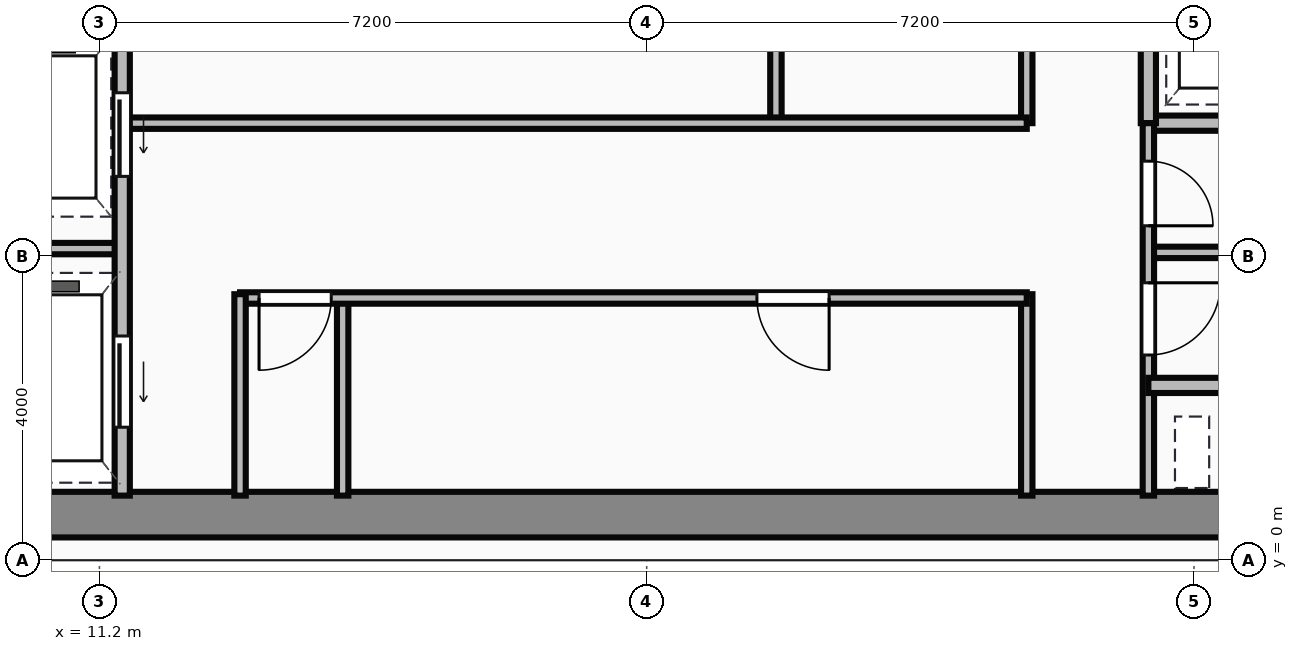
"""IFC4 building model, lengths in metres.
Left out: names, types, materials, properties, quantities, classifications, styles, units other than length and angle.
Written with IfcOpenShell. Run it as: python <this file> out.ifc"""

import sys

from ifc_helpers import new_model, si_unit, direction, frame, frame_2d, origin, place, context, subcontext, project, spatial, rectangle, extrude, source, transform, mapped, element, fill, save


model = new_model("IFC4")
c1 = context("Model", 3, precision=1e-05, world=origin(), true_north=direction((0.0, 1.0)))
c2 = subcontext(c1, "Body", "Model", "MODEL_VIEW")
j1 = project(units=[si_unit("LENGTHUNIT", "METRE"), si_unit("PLANEANGLEUNIT", "RADIAN")], contexts=[c1])
p1 = place(None, origin())
s1 = spatial("IfcSite", under=j1, at=p1, CompositionType="ELEMENT")
p2 = place(p1, origin())
s2 = spatial("IfcBuilding", under=s1, at=p2, CompositionType="ELEMENT")
p3 = place(p2, frame((0.0, 0.0, 195.9)))
s3 = spatial("IfcBuildingStorey", under=s2, at=p3, CompositionType="ELEMENT", Elevation=195.9)
m1 = source(origin(), c2, "Body", "SweptSolid", [
    extrude(rectangle(XDim=29.5, YDim=0.6, at=frame_2d((14.75, 0.0))), origin(), (0.0, 0.0, 1.0), 3.65),
])
p4 = place(p3, frame((4.5, 0.6, 0.0), z_axis=(0.0, 0.0, 1.0), x_axis=(1.0, 0.0, 0.0)))
e1 = element("IfcWall", 1, at=p4, inside=s3, PredefinedType="SHEAR", context=c2, shape_type="MappedRepresentation", body=[
    mapped(m1, transform((0.0, 0.0, 0.0))),
])
m2 = source(origin(), c2, "Body", "SweptSolid", [
    extrude(rectangle(XDim=9.6, YDim=0.2, at=frame_2d((4.8, 0.0))), origin(), (0.0, 0.0, 1.0), 3.4),
])
p5 = place(p3, frame((11.5, 0.85, 0.0), z_axis=(0.0, 0.0, 1.0), x_axis=(0.0, 1.0, 0.0)))
e2 = element("IfcWall", 2, at=p5, inside=s3, PredefinedType="PARTITIONING", context=c2, shape_type="MappedRepresentation", body=[
    mapped(m2, transform((0.0, 0.0, 0.0))),
])
p6 = place(p5, frame((4.2, 0.0, 0.0)))
e3 = element("IfcOpeningElement", 3, at=p6, cuts=e2, PredefinedType="OPENING", context=c2, shape_type="SweptSolid", body=[
    extrude(rectangle(XDim=1.1, YDim=2.15, at=frame_2d((0.55, 1.075))), frame((0.0, 0.11, 0.0), z_axis=(0.0, -1.0, 0.0), x_axis=(1.0, 0.0, 0.0)), (0.0, 0.0, 1.0), 0.22),
])
p7 = place(p5, frame((0.9, 0.0, 0.0)))
e4 = element("IfcOpeningElement", 4, at=p7, cuts=e2, PredefinedType="OPENING", context=c2, shape_type="SweptSolid", body=[
    extrude(rectangle(XDim=1.2, YDim=2.15, at=frame_2d((0.6, 1.075))), frame((0.0, 0.11, 0.0), z_axis=(0.0, -1.0, 0.0), x_axis=(1.0, 0.0, 0.0)), (0.0, 0.0, 1.0), 0.22),
])
m3 = source(origin(), c2, "Body", "SweptSolid", [
    extrude(rectangle(XDim=2.4, YDim=0.15, at=frame_2d((1.2, 0.0))), origin(), (0.0, 0.0, 1.0), 3.4),
])
p8 = place(p3, frame((9.1, 4.1, 0.0), z_axis=(0.0, 0.0, 1.0), x_axis=(1.0, 0.0, 0.0)))
e5 = element("IfcWall", 5, at=p8, inside=s3, PredefinedType="PARTITIONING", context=c2, shape_type="MappedRepresentation", body=[
    mapped(m3, transform((0.0, 0.0, 0.0))),
])
m4 = source(origin(), c2, "Body", "SweptSolid", [
    extrude(rectangle(XDim=2.65, YDim=0.15, at=frame_2d((1.325, 0.0))), origin(), (0.0, 0.0, 1.0), 3.4),
])
p9 = place(p3, frame((13.05, 0.85, 0.0), z_axis=(0.0, 0.0, 1.0), x_axis=(0.0, 1.0, 0.0)))
e6 = element("IfcWall", 6, at=p9, inside=s3, PredefinedType="PARTITIONING", context=c2, shape_type="MappedRepresentation", body=[
    mapped(m4, transform((0.0, 0.0, 0.0))),
])
m5 = source(origin(), c2, "Body", "SweptSolid", [
    extrude(rectangle(XDim=10.35, YDim=0.15, at=frame_2d((5.175, 0.0))), origin(), (0.0, 0.0, 1.0), 3.4),
])
p10 = place(p3, frame((13.05, 3.45, 0.0), z_axis=(0.0, 0.0, 1.0), x_axis=(1.0, 0.0, 0.0)))
e7 = element("IfcWall", 7, at=p10, inside=s3, PredefinedType="PARTITIONING", context=c2, shape_type="MappedRepresentation", body=[
    mapped(m5, transform((0.0, 0.0, 0.0))),
])
p11 = place(p10, frame((0.25, 0.0, 0.0)))
e8 = element("IfcOpeningElement", 8, at=p11, cuts=e7, PredefinedType="OPENING", context=c2, shape_type="SweptSolid", body=[
    extrude(rectangle(XDim=0.95, YDim=2.15, at=frame_2d((0.475, 1.075))), frame((0.0, 0.085, 0.0), z_axis=(0.0, -1.0, 0.0), x_axis=(1.0, 0.0, 0.0)), (0.0, 0.0, 1.0), 0.17),
])
p12 = place(p10, frame((6.8, 0.0, 0.0)))
e9 = element("IfcOpeningElement", 9, at=p12, cuts=e7, PredefinedType="OPENING", context=c2, shape_type="SweptSolid", body=[
    extrude(rectangle(XDim=0.95, YDim=2.15, at=frame_2d((0.475, 1.075))), frame((0.0, 0.085, 0.0), z_axis=(0.0, -1.0, 0.0), x_axis=(1.0, 0.0, 0.0)), (0.0, 0.0, 1.0), 0.17),
])
p13 = place(p3, frame((23.4, 0.85, 0.0), z_axis=(0.0, 0.0, 1.0), x_axis=(0.0, 1.0, 0.0)))
e10 = element("IfcWall", 10, at=p13, inside=s3, PredefinedType="PARTITIONING", context=c2, shape_type="MappedRepresentation", body=[
    mapped(m4, transform((0.0, 0.0, 0.0))),
])
m6 = source(origin(), c2, "Body", "SweptSolid", [
    extrude(rectangle(XDim=2.6, YDim=0.15, at=frame_2d((1.3, 0.0))), origin(), (0.0, 0.0, 1.0), 3.4),
])
p14 = place(p3, frame((14.4, 0.85, 0.0), z_axis=(0.0, 0.0, 1.0), x_axis=(0.0, 1.0, 0.0)))
e11 = element("IfcWall", 11, at=p14, inside=s3, PredefinedType="PARTITIONING", context=c2, shape_type="MappedRepresentation", body=[
    mapped(m6, transform((0.0, 0.0, 0.0))),
])
m7 = source(origin(), c2, "Body", "SweptSolid", [
    extrude(rectangle(XDim=11.85, YDim=0.15, at=frame_2d((5.925, 0.0))), origin(), (0.0, 0.0, 1.0), 3.4),
])
p15 = place(p3, frame((11.55, 5.75, 0.0), z_axis=(0.0, 0.0, 1.0), x_axis=(1.0, 0.0, 0.0)))
e12 = element("IfcWall", 12, at=p15, inside=s3, PredefinedType="PARTITIONING", context=c2, shape_type="MappedRepresentation", body=[
    mapped(m7, transform((0.0, 0.0, 0.0))),
])
m8 = source(origin(), c2, "Body", "SweptSolid", [
    extrude(rectangle(XDim=2.6, YDim=0.15, at=frame_2d((1.3, 0.0))), origin(), (0.0, 0.0, 1.0), 3.4),
])
p16 = place(p3, frame((23.4, 5.75, 0.0), z_axis=(0.0, 0.0, 1.0), x_axis=(0.0, 1.0, 0.0)))
e13 = element("IfcWall", 13, at=p16, inside=s3, PredefinedType="PARTITIONING", context=c2, shape_type="MappedRepresentation", body=[
    mapped(m8, transform((0.0, 0.0, 0.0))),
])
m9 = source(origin(), c2, "Body", "SweptSolid", [
    extrude(rectangle(XDim=2.5, YDim=0.15, at=frame_2d((1.25, 0.0))), origin(), (0.0, 0.0, 1.0), 3.4),
])
p17 = place(p3, frame((20.1, 5.8, 0.0), z_axis=(0.0, 0.0, 1.0), x_axis=(0.0, 1.0, 0.0)))
e14 = element("IfcWall", 14, at=p17, inside=s3, PredefinedType="PARTITIONING", context=c2, shape_type="MappedRepresentation", body=[
    mapped(m9, transform((0.0, 0.0, 0.0))),
])
m10 = source(origin(), c2, "Body", "SweptSolid", [
    extrude(rectangle(XDim=4.55, YDim=0.2, at=frame_2d((2.275, 0.0))), origin(), (0.0, 0.0, 1.0), 3.4),
])
p18 = place(p3, frame((25.0, 5.75, 0.0), z_axis=(0.0, 0.0, 1.0), x_axis=(1.0, 0.0, 0.0)))
e15 = element("IfcWall", 15, at=p18, inside=s3, PredefinedType="PARTITIONING", context=c2, shape_type="MappedRepresentation", body=[
    mapped(m10, transform((0.0, 0.0, 0.0))),
])
m11 = source(origin(), c2, "Body", "SweptSolid", [
    extrude(rectangle(XDim=2.6, YDim=0.2, at=frame_2d((1.3, 0.0))), origin(), (0.0, 0.0, 1.0), 3.4),
])
p19 = place(p3, frame((25.0, 5.75, 0.0), z_axis=(0.0, 0.0, 1.0), x_axis=(0.0, 1.0, 0.0)))
e16 = element("IfcWall", 16, at=p19, inside=s3, PredefinedType="PARTITIONING", context=c2, shape_type="MappedRepresentation", body=[
    mapped(m11, transform((0.0, 0.0, 0.0))),
])
m12 = source(origin(), c2, "Body", "SweptSolid", [
    extrude(rectangle(XDim=4.9, YDim=0.15, at=frame_2d((2.45, 0.0))), origin(), (0.0, 0.0, 1.0), 3.4),
])
p20 = place(p3, frame((25.0, 0.85, 0.0), z_axis=(0.0, 0.0, 1.0), x_axis=(0.0, 1.0, 0.0)))
e17 = element("IfcWall", 17, at=p20, inside=s3, PredefinedType="PARTITIONING", context=c2, shape_type="MappedRepresentation", body=[
    mapped(m12, transform((0.0, 0.0, 0.0))),
])
p21 = place(p20, frame((1.85, 0.0, 0.0)))
e18 = element("IfcOpeningElement", 18, at=p21, cuts=e17, PredefinedType="OPENING", context=c2, shape_type="SweptSolid", body=[
    extrude(rectangle(XDim=0.95, YDim=2.15, at=frame_2d((0.475, 1.075))), frame((0.0, 0.085, 0.0), z_axis=(0.0, -1.0, 0.0), x_axis=(1.0, 0.0, 0.0)), (0.0, 0.0, 1.0), 0.17),
])
p22 = place(p20, frame((3.55, 0.0, 0.0)))
e19 = element("IfcOpeningElement", 19, at=p22, cuts=e17, PredefinedType="OPENING", context=c2, shape_type="SweptSolid", body=[
    extrude(rectangle(XDim=0.85, YDim=2.15, at=frame_2d((0.425, 1.075))), frame((0.0, 0.085, 0.0), z_axis=(0.0, -1.0, 0.0), x_axis=(1.0, 0.0, 0.0)), (0.0, 0.0, 1.0), 0.17),
])
m13 = source(origin(), c2, "Body", "SweptSolid", [
    extrude(rectangle(XDim=2.4, YDim=0.2, at=frame_2d((1.2, 0.0))), origin(), (0.0, 0.0, 1.0), 3.4),
])
p23 = place(p3, frame((25.0, 2.3, 0.0), z_axis=(0.0, 0.0, 1.0), x_axis=(1.0, 0.0, 0.0)))
e20 = element("IfcWall", 20, at=p23, inside=s3, PredefinedType="PARTITIONING", context=c2, shape_type="MappedRepresentation", body=[
    mapped(m13, transform((0.0, 0.0, 0.0))),
])
m14 = source(origin(), c2, "Body", "SweptSolid", [
    extrude(rectangle(XDim=4.55, YDim=0.15, at=frame_2d((2.275, 0.0))), origin(), (0.0, 0.0, 1.0), 3.4),
])
p24 = place(p3, frame((25.0, 4.05, 0.0), z_axis=(0.0, 0.0, 1.0), x_axis=(1.0, 0.0, 0.0)))
e21 = element("IfcWall", 21, at=p24, inside=s3, PredefinedType="PARTITIONING", context=c2, shape_type="MappedRepresentation", body=[
    mapped(m14, transform((0.0, 0.0, 0.0))),
])
m15 = source(origin(), c2, "Body", "SweptSolid", [
    extrude(rectangle(XDim=1.1, YDim=2.15, at=frame_2d((0.55, 1.075))), frame((0.0, 0.025, 0.0), z_axis=(0.0, -1.0, 0.0), x_axis=(1.0, 0.0, 0.0)), (0.0, 0.0, 1.0), 0.05),
])
p25 = place(p6, frame((1.1, 0.0, 0.0), z_axis=(0.0, 0.0, 1.0), x_axis=(-1.0, 0.0, 0.0)))
e22 = element("IfcDoor", 22, at=p25, inside=s3, OperationType="SLIDING_TO_LEFT", PredefinedType="DOOR", context=c2, shape_type="MappedRepresentation", body=[
    mapped(m15, transform((0.0, 0.0, 0.0))),
])
fill(e3, e22)
m16 = source(origin(), c2, "Body", "SweptSolid", [
    extrude(rectangle(XDim=1.2, YDim=2.15, at=frame_2d((0.6, 1.075))), frame((0.0, 0.025, 0.0), z_axis=(0.0, -1.0, 0.0), x_axis=(1.0, 0.0, 0.0)), (0.0, 0.0, 1.0), 0.05),
])
p26 = place(p7, frame((1.2, 0.0, 0.0), z_axis=(0.0, 0.0, 1.0), x_axis=(-1.0, 0.0, 0.0)))
e23 = element("IfcDoor", 23, at=p26, inside=s3, OperationType="SLIDING_TO_LEFT", PredefinedType="DOOR", context=c2, shape_type="MappedRepresentation", body=[
    mapped(m16, transform((0.0, 0.0, 0.0))),
])
fill(e4, e23)
m17 = source(origin(), c2, "Body", "SweptSolid", [
    extrude(rectangle(XDim=0.95, YDim=2.15, at=frame_2d((0.475, 1.075))), frame((0.0, 0.025, 0.0), z_axis=(0.0, -1.0, 0.0), x_axis=(1.0, 0.0, 0.0)), (0.0, 0.0, 1.0), 0.05),
])
p27 = place(p11, origin())
e24 = element("IfcDoor", 24, at=p27, inside=s3, OperationType="SINGLE_SWING_LEFT", PredefinedType="DOOR", context=c2, shape_type="MappedRepresentation", body=[
    mapped(m17, transform((0.0, 0.0, 0.0))),
])
fill(e8, e24)
p28 = place(p12, origin())
e25 = element("IfcDoor", 25, at=p28, inside=s3, OperationType="SINGLE_SWING_RIGHT", PredefinedType="DOOR", context=c2, shape_type="MappedRepresentation", body=[
    mapped(m17, transform((0.0, 0.0, 0.0))),
])
fill(e9, e25)
p29 = place(p21, origin())
e26 = element("IfcDoor", 26, at=p29, inside=s3, OperationType="SINGLE_SWING_RIGHT", PredefinedType="DOOR", context=c2, shape_type="MappedRepresentation", body=[
    mapped(m17, transform((0.0, 0.0, 0.0))),
])
fill(e18, e26)
m18 = source(origin(), c2, "Body", "SweptSolid", [
    extrude(rectangle(XDim=0.85, YDim=2.15, at=frame_2d((0.425, 1.075))), frame((0.0, 0.025, 0.0), z_axis=(0.0, -1.0, 0.0), x_axis=(1.0, 0.0, 0.0)), (0.0, 0.0, 1.0), 0.05),
])
p30 = place(p22, origin())
e27 = element("IfcDoor", 27, at=p30, inside=s3, OperationType="SINGLE_SWING_LEFT", PredefinedType="DOOR", context=c2, shape_type="MappedRepresentation", body=[
    mapped(m18, transform((0.0, 0.0, 0.0))),
])
fill(e19, e27)
save(model, sys.argv[1])
